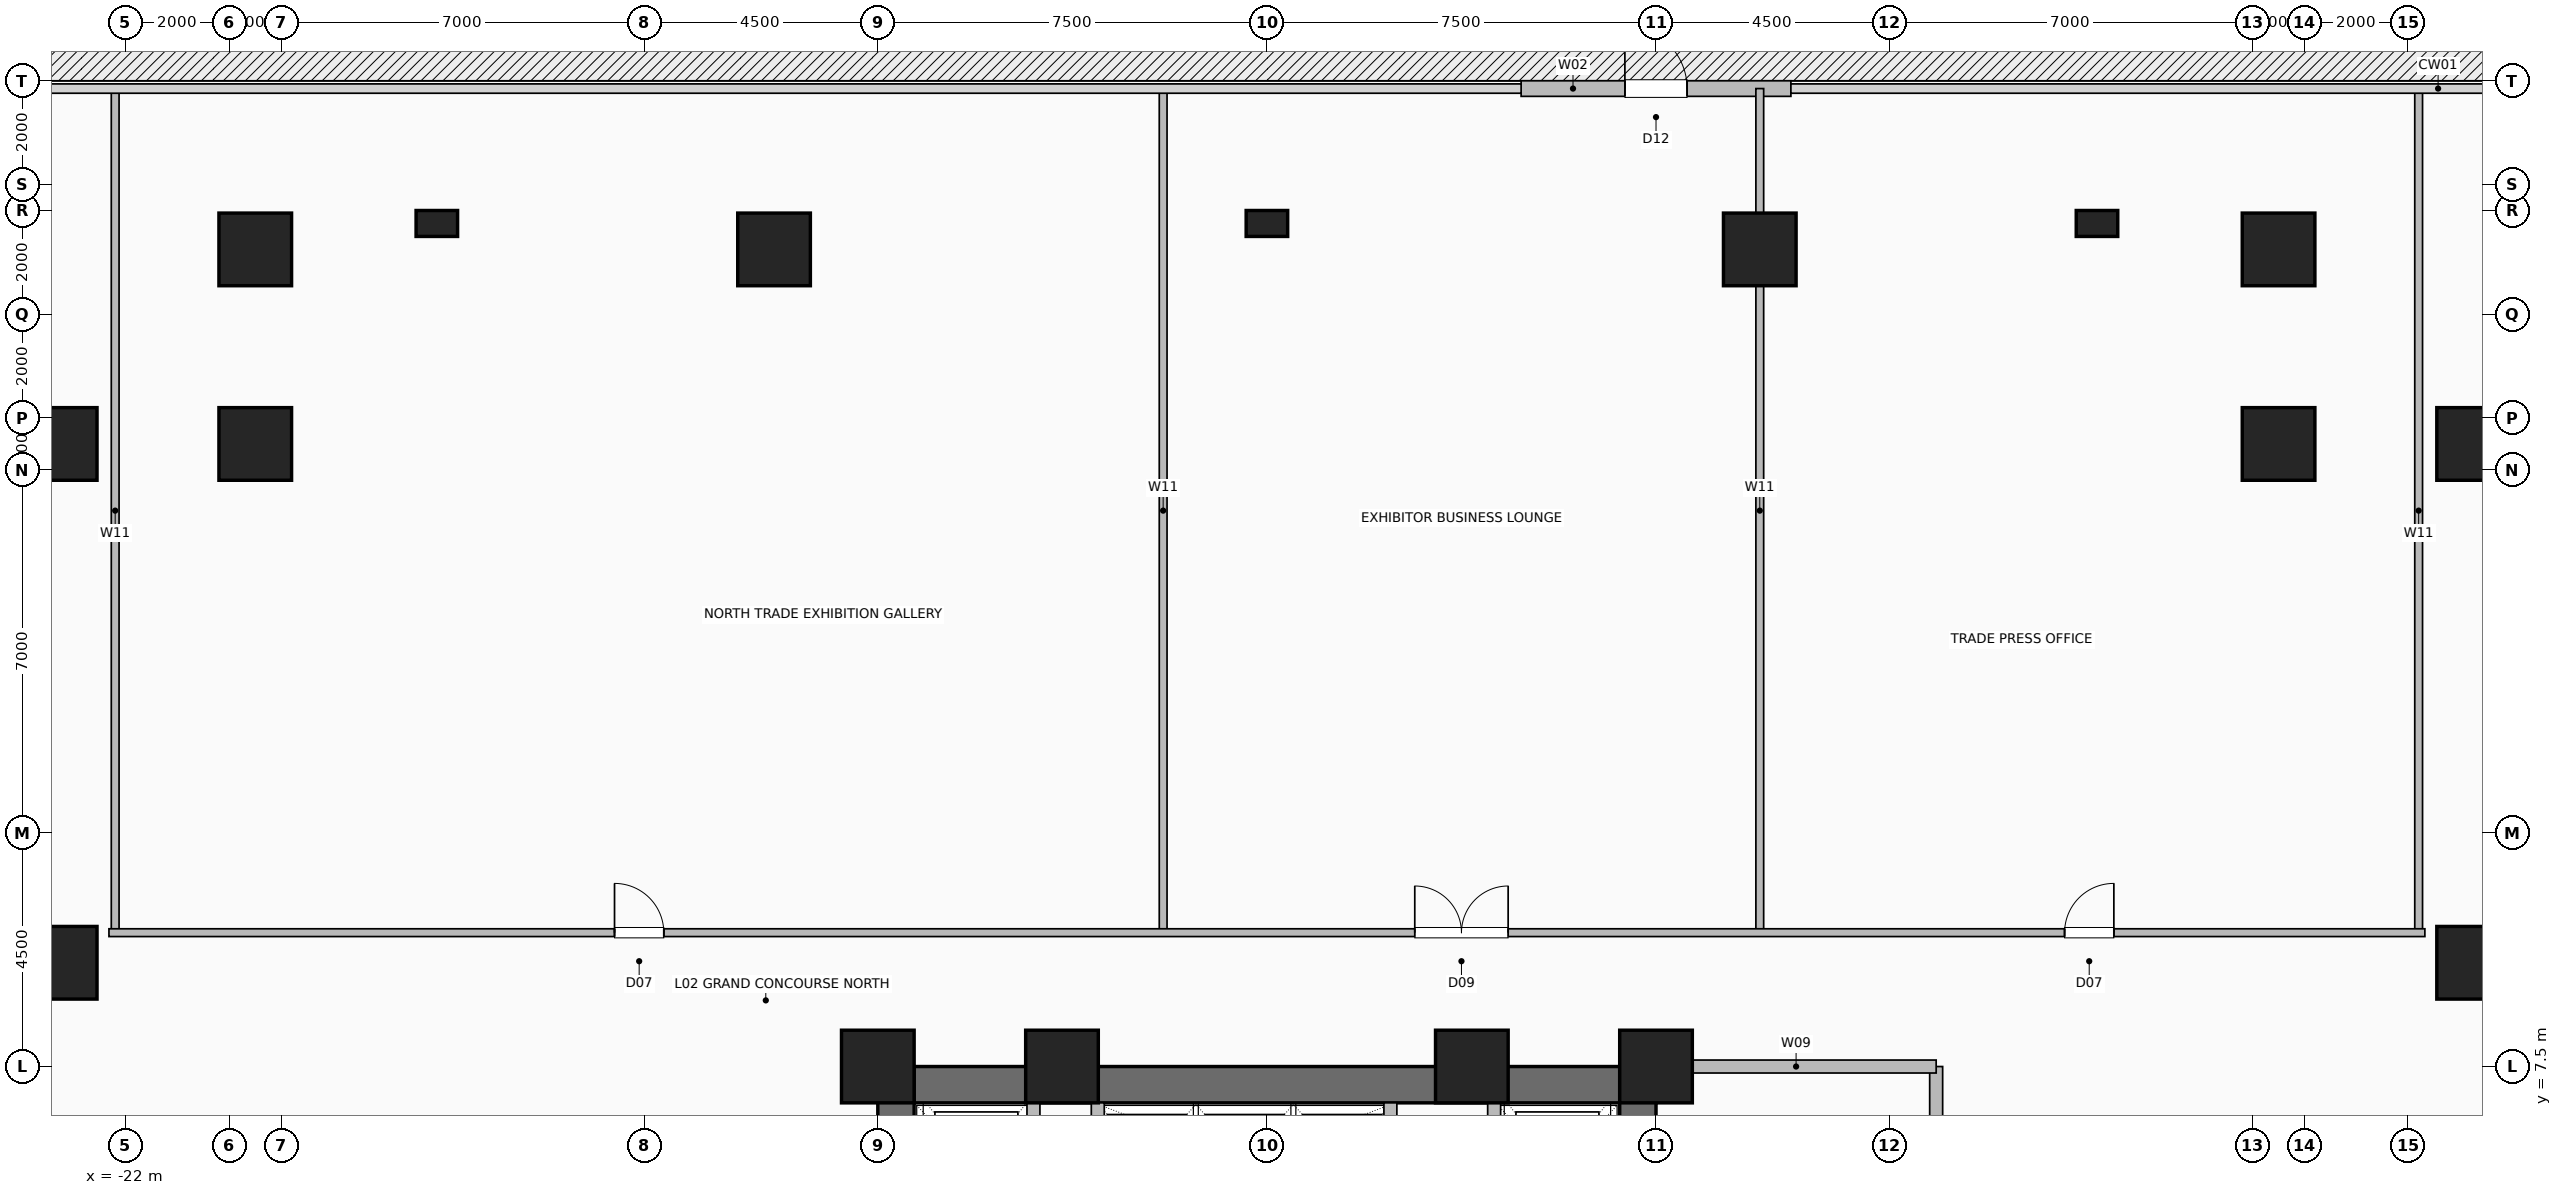
"""IFC4 building model, lengths in metres.
Left out: names, types, materials, properties, quantities, classifications, styles, units other than length and angle.
Written with IfcOpenShell. Run it as: python <this file> out.ifc"""

import sys

from ifc_helpers import new_model, si_unit, direction, frame, frame_2d, origin, origin_2d, place, context, subcontext, project, spatial, rectangle, hollow_rectangle, extrude, element, fill, save


model = new_model("IFC4")
c1 = context("Model", 3, precision=1e-05, world=origin(), true_north=direction((0.0, 1.0)))
c2 = subcontext(c1, "Body", "Model", "MODEL_VIEW")
j1 = project(units=[si_unit("LENGTHUNIT", "METRE"), si_unit("PLANEANGLEUNIT", "RADIAN")], contexts=[c1])
p1 = place(None, origin())
s1 = spatial("IfcSite", under=j1, at=p1, CompositionType="ELEMENT")
p2 = place(p1, origin())
s2 = spatial("IfcBuilding", under=s1, at=p2, CompositionType="ELEMENT")
p3 = place(p2, frame((0.0, 0.0, 10.8)))
s3 = spatial("IfcBuildingStorey", under=s2, at=p3, CompositionType="ELEMENT", Elevation=10.8)
for number, where, z_axis, x_axis in (
    (1, (7.5, 7.5, 0.0), (0.0, 0.0, 1.0), (1.0, 0.0, 0.0)),
    (2, (3.95, 7.5, 0.0), (0.0, 0.0, 1.0), (1.0, 0.0, 0.0)),
    (3, (-3.95, 7.5, 0.0), (0.0, 0.0, 1.0), (1.0, 0.0, 0.0)),
    (4, (-7.5, 7.5, 0.0), (0.0, 0.0, 1.0), (1.0, 0.0, 0.0)),
    (5, (-19.5, 23.25, 0.0), (0.0, 0.0, 1.0), (1.0, 0.0, 0.0)),
    (6, (-9.5, 23.25, 0.0), (0.0, 0.0, 1.0), (1.0, 0.0, 0.0)),
    (7, (9.5, 23.25, 0.0), (0.0, 0.0, 1.0), (1.0, 0.0, 0.0)),
    (8, (19.5, 23.25, 0.0), (0.0, 0.0, 1.0), (1.0, 0.0, 0.0)),
    (9, (-23.25, 9.5, 0.0), (0.0, 0.0, 1.0), (1.0, 0.0, 0.0)),
    (10, (-23.25, 19.5, 0.0), (0.0, 0.0, 1.0), (1.0, 0.0, 0.0)),
    (11, (23.25, 9.5, 0.0), (0.0, 0.0, 1.0), (1.0, 0.0, 0.0)),
    (12, (23.25, 19.5, 0.0), (0.0, 0.0, 1.0), (1.0, 0.0, 0.0)),
    (13, (19.5, 19.5, 0.0), (0.0, 0.0, 1.0), (1.0, 0.0, 0.0)),
    (14, (-19.5, 19.5, 0.0), (0.0, 0.0, 1.0), (1.0, 0.0, 0.0)),
):
    element("IfcColumn", number, at=place(p3, frame(where, z_axis=z_axis, x_axis=x_axis)), inside=s3, PredefinedType="COLUMN", context=c2, shape_type="SweptSolid", body=[
        extrude(hollow_rectangle(XDim=1.4, YDim=1.4, WallThickness=0.06, at=origin_2d()), origin(), (0.0, 0.0, 1.0), 5.4),
    ])
for number, where, z_axis, x_axis in (
    (15, (-16.0, 23.75, 0.0), (0.0, 0.0, 1.0), (1.0, 0.0, 0.0)),
    (16, (0.0, 23.75, 0.0), (0.0, 0.0, 1.0), (1.0, 0.0, 0.0)),
    (17, (16.0, 23.75, 0.0), (0.0, 0.0, 1.0), (1.0, 0.0, 0.0)),
):
    element("IfcColumn", number, at=place(p3, frame(where, z_axis=z_axis, x_axis=x_axis)), inside=s3, PredefinedType="PILASTER", context=c2, shape_type="SweptSolid", body=[
        extrude(rectangle(XDim=0.5, YDim=0.8, at=origin_2d()), origin(), (0.0, 0.0, 1.0), 5.4),
    ])
p4 = place(p3, frame((4.9, 26.35, 0.0), z_axis=(0.0, 0.0, 1.0), x_axis=(1.0, 0.0, 0.0)))
e18 = element("IfcWall", 18, at=p4, inside=s3, PredefinedType="SOLIDWALL", context=c2, shape_type="SweptSolid", body=[
    extrude(rectangle(XDim=5.2, YDim=0.3, at=frame_2d((2.6, 0.0))), origin(), (0.0, 0.0, 1.0), 5.0),
])
p5 = place(p4, frame((2.0, 0.0, 0.0)))
e19 = element("IfcOpeningElement", 19, at=p5, cuts=e18, PredefinedType="OPENING", context=c2, shape_type="SweptSolid", body=[
    extrude(rectangle(XDim=1.2, YDim=2.25, at=frame_2d((0.6, 1.125))), frame((0.0, 0.16, 0.0), z_axis=(0.0, -1.0, 0.0), x_axis=(1.0, 0.0, 0.0)), (0.0, 0.0, 1.0), 0.32),
])
p6 = place(p3, frame((-7.5, 7.15, 0.0), z_axis=(0.0, 0.0, 1.0), x_axis=(1.0, 0.0, 0.0)))
e20 = element("IfcWall", 20, at=p6, inside=s3, PredefinedType="SHEAR", context=c2, shape_type="SweptSolid", body=[
    extrude(rectangle(XDim=15.0, YDim=0.7, at=frame_2d((7.5, 0.0))), origin(), (0.0, 0.0, 1.0), 5.0),
])
p7 = place(p3, frame((-7.15, -7.5, 0.0), z_axis=(0.0, 0.0, 1.0), x_axis=(0.0, 1.0, 0.0)))
e21 = element("IfcWall", 21, at=p7, inside=s3, PredefinedType="SHEAR", context=c2, shape_type="SweptSolid", body=[
    extrude(rectangle(XDim=15.0, YDim=0.7, at=frame_2d((7.5, 0.0))), origin(), (0.0, 0.0, 1.0), 5.0),
])
p8 = place(p7, frame((9.5, 0.0, 0.0)))
e22 = element("IfcOpeningElement", 22, at=p8, cuts=e21, PredefinedType="OPENING", context=c2, shape_type="SweptSolid", body=[
    extrude(rectangle(XDim=1.0, YDim=2.08, at=frame_2d((0.5, 1.04))), frame((0.0, 0.36, 0.0), z_axis=(0.0, -1.0, 0.0), x_axis=(1.0, 0.0, 0.0)), (0.0, 0.0, 1.0), 0.72),
])
p9 = place(p3, frame((7.15, -7.5, 0.0), z_axis=(0.0, 0.0, 1.0), x_axis=(0.0, 1.0, 0.0)))
e23 = element("IfcWall", 23, at=p9, inside=s3, PredefinedType="SHEAR", context=c2, shape_type="SweptSolid", body=[
    extrude(rectangle(XDim=15.0, YDim=0.7, at=frame_2d((7.5, 0.0))), origin(), (0.0, 0.0, 1.0), 5.0),
])
p10 = place(p9, frame((12.6, 0.0, 0.0)))
e24 = element("IfcOpeningElement", 24, at=p10, cuts=e23, PredefinedType="OPENING", context=c2, shape_type="SweptSolid", body=[
    extrude(rectangle(XDim=1.2, YDim=2.2, at=frame_2d((0.6, 1.1))), frame((0.0, 0.36, 0.0), z_axis=(0.0, -1.0, 0.0), x_axis=(1.0, 0.0, 0.0)), (0.0, 0.0, 1.0), 0.72),
])
for number, where, z_axis, x_axis in (
    (25, (-3.26, 4.58, 0.0), (0.0, 0.0, 1.0), (0.0, 1.0, 0.0)),
    (26, (2.38, 4.58, 0.0), (0.0, 0.0, 1.0), (0.0, 1.0, 0.0)),
):
    element("IfcWall", number, at=place(p3, frame(where, z_axis=z_axis, x_axis=x_axis)), inside=s3, PredefinedType="SHEAR", context=c2, shape_type="SweptSolid", body=[
        extrude(rectangle(XDim=2.22, YDim=0.25, at=frame_2d((1.11, 0.0))), origin(), (0.0, 0.0, 1.0), 5.0),
    ])
p11 = place(p3, frame((-4.5, 4.35, 0.0), z_axis=(0.0, 0.0, 1.0), x_axis=(0.0, 1.0, 0.0)))
e27 = element("IfcWall", 27, at=p11, inside=s3, PredefinedType="SHEAR", context=c2, shape_type="SweptSolid", body=[
    extrude(rectangle(XDim=2.85, YDim=0.25, at=frame_2d((1.425, 0.0))), origin(), (0.0, 0.0, 1.0), 5.0),
])
p12 = place(p3, frame((4.38, 4.3, 0.0), z_axis=(0.0, 0.0, 1.0), x_axis=(0.0, 1.0, 0.0)))
e28 = element("IfcWall", 28, at=p12, inside=s3, PredefinedType="SHEAR", context=c2, shape_type="SweptSolid", body=[
    extrude(rectangle(XDim=2.5, YDim=0.25, at=frame_2d((1.25, 0.0))), origin(), (0.0, 0.0, 1.0), 5.0),
])
p13 = place(p3, frame((12.9, 1.75, 0.0), z_axis=(0.0, 0.0, 1.0), x_axis=(0.0, 1.0, 0.0)))
e29 = element("IfcWall", 29, at=p13, inside=s3, PredefinedType="SHEAR", context=c2, shape_type="SweptSolid", body=[
    extrude(rectangle(XDim=5.75, YDim=0.25, at=frame_2d((2.875, 0.0))), origin(), (0.0, 0.0, 1.0), 5.0),
])
p14 = place(p13, frame((1.8, 0.0, 0.0)))
e30 = element("IfcOpeningElement", 30, at=p14, cuts=e29, PredefinedType="OPENING", context=c2, shape_type="SweptSolid", body=[
    extrude(rectangle(XDim=1.0, YDim=2.08, at=frame_2d((0.5, 1.04))), frame((0.0, 0.135, 0.0), z_axis=(0.0, -1.0, 0.0), x_axis=(1.0, 0.0, 0.0)), (0.0, 0.0, 1.0), 0.27),
])
p15 = place(p3, frame((7.5, 7.5, 0.0), z_axis=(0.0, 0.0, 1.0), x_axis=(1.0, 0.0, 0.0)))
e31 = element("IfcWall", 31, at=p15, inside=s3, PredefinedType="SHEAR", context=c2, shape_type="SweptSolid", body=[
    extrude(rectangle(XDim=5.4, YDim=0.25, at=frame_2d((2.7, 0.0))), origin(), (0.0, 0.0, 1.0), 5.0),
])
p16 = place(p3, frame((-22.2, 10.08, 0.0), z_axis=(0.0, 0.0, 1.0), x_axis=(0.0, 1.0, 0.0)))
e32 = element("IfcWall", 32, at=p16, inside=s3, PredefinedType="PARTITIONING", context=c2, shape_type="SweptSolid", body=[
    extrude(rectangle(XDim=16.27, YDim=0.15, at=frame_2d((8.135, 0.0))), origin(), (0.0, 0.0, 1.0), 5.0),
])
p17 = place(p3, frame((-2.0, 10.08, 0.0), z_axis=(0.0, 0.0, 1.0), x_axis=(0.0, 1.0, 0.0)))
e33 = element("IfcWall", 33, at=p17, inside=s3, PredefinedType="PARTITIONING", context=c2, shape_type="SweptSolid", body=[
    extrude(rectangle(XDim=16.27, YDim=0.15, at=frame_2d((8.135, 0.0))), origin(), (0.0, 0.0, 1.0), 4.518),
])
for number, where, z_axis, x_axis in (
    (34, (9.5, 10.08, 0.0), (0.0, 0.0, 1.0), (0.0, 1.0, 0.0)),
    (35, (22.2, 10.08, 0.0), (0.0, 0.0, 1.0), (0.0, 1.0, 0.0)),
):
    element("IfcWall", number, at=place(p3, frame(where, z_axis=z_axis, x_axis=x_axis)), inside=s3, PredefinedType="PARTITIONING", context=c2, shape_type="SweptSolid", body=[
        extrude(rectangle(XDim=16.27, YDim=0.15, at=frame_2d((8.135, 0.0))), origin(), (0.0, 0.0, 1.0), 5.0),
    ])
p18 = place(p3, frame((-22.32, 10.08, 0.0), z_axis=(0.0, 0.0, 1.0), x_axis=(1.0, 0.0, 0.0)))
e36 = element("IfcWall", 36, at=p18, inside=s3, PredefinedType="PARTITIONING", context=c2, shape_type="SweptSolid", body=[
    extrude(rectangle(XDim=44.64, YDim=0.15, at=frame_2d((22.32, 0.0))), origin(), (0.0, 0.0, 1.0), 5.0),
])
p19 = place(p18, frame((9.745, 0.0, 0.0)))
e37 = element("IfcOpeningElement", 37, at=p19, cuts=e36, PredefinedType="OPENING", context=c2, shape_type="SweptSolid", body=[
    extrude(rectangle(XDim=0.95, YDim=2.06, at=frame_2d((0.475, 1.03))), frame((0.0, 0.085, 0.0), z_axis=(0.0, -1.0, 0.0), x_axis=(1.0, 0.0, 0.0)), (0.0, 0.0, 1.0), 0.17),
])
p20 = place(p18, frame((25.17, 0.0, 0.0)))
e38 = element("IfcOpeningElement", 38, at=p20, cuts=e36, PredefinedType="OPENING", context=c2, shape_type="SweptSolid", body=[
    extrude(rectangle(XDim=1.8, YDim=2.08, at=frame_2d((0.9, 1.04))), frame((0.0, 0.085, 0.0), z_axis=(0.0, -1.0, 0.0), x_axis=(1.0, 0.0, 0.0)), (0.0, 0.0, 1.0), 0.17),
])
p21 = place(p18, frame((37.695, 0.0, 0.0)))
e39 = element("IfcOpeningElement", 39, at=p21, cuts=e36, PredefinedType="OPENING", context=c2, shape_type="SweptSolid", body=[
    extrude(rectangle(XDim=0.95, YDim=2.06, at=frame_2d((0.475, 1.03))), frame((0.0, 0.085, 0.0), z_axis=(0.0, -1.0, 0.0), x_axis=(1.0, 0.0, 0.0)), (0.0, 0.0, 1.0), 0.17),
])
p22 = place(p5, origin())
e40 = element("IfcDoor", 40, at=p22, inside=s3, OperationType="SINGLE_SWING_LEFT", PredefinedType="DOOR", context=c2, shape_type="SweptSolid", body=[
    extrude(rectangle(XDim=1.2, YDim=2.25, at=frame_2d((0.6, 1.125))), frame((0.0, 0.025, 0.0), z_axis=(0.0, -1.0, 0.0), x_axis=(1.0, 0.0, 0.0)), (0.0, 0.0, 1.0), 0.05),
])
fill(e19, e40)
p23 = place(p19, origin())
e41 = element("IfcDoor", 41, at=p23, inside=s3, OperationType="SINGLE_SWING_LEFT", PredefinedType="DOOR", context=c2, shape_type="SweptSolid", body=[
    extrude(rectangle(XDim=0.95, YDim=2.06, at=frame_2d((0.475, 1.03))), frame((0.0, 0.025, 0.0), z_axis=(0.0, -1.0, 0.0), x_axis=(1.0, 0.0, 0.0)), (0.0, 0.0, 1.0), 0.05),
])
fill(e37, e41)
p24 = place(p20, origin())
e42 = element("IfcDoor", 42, at=p24, inside=s3, OperationType="DOUBLE_DOOR_SINGLE_SWING", PredefinedType="DOOR", context=c2, shape_type="SweptSolid", body=[
    extrude(rectangle(XDim=1.8, YDim=2.08, at=frame_2d((0.9, 1.04))), frame((0.0, 0.025, 0.0), z_axis=(0.0, -1.0, 0.0), x_axis=(1.0, 0.0, 0.0)), (0.0, 0.0, 1.0), 0.05),
])
fill(e38, e42)
p25 = place(p21, origin())
e43 = element("IfcDoor", 43, at=p25, inside=s3, OperationType="SINGLE_SWING_RIGHT", PredefinedType="DOOR", context=c2, shape_type="SweptSolid", body=[
    extrude(rectangle(XDim=0.95, YDim=2.06, at=frame_2d((0.475, 1.03))), frame((0.0, 0.025, 0.0), z_axis=(0.0, -1.0, 0.0), x_axis=(1.0, 0.0, 0.0)), (0.0, 0.0, 1.0), 0.05),
])
fill(e39, e43)
save(model, sys.argv[1])
